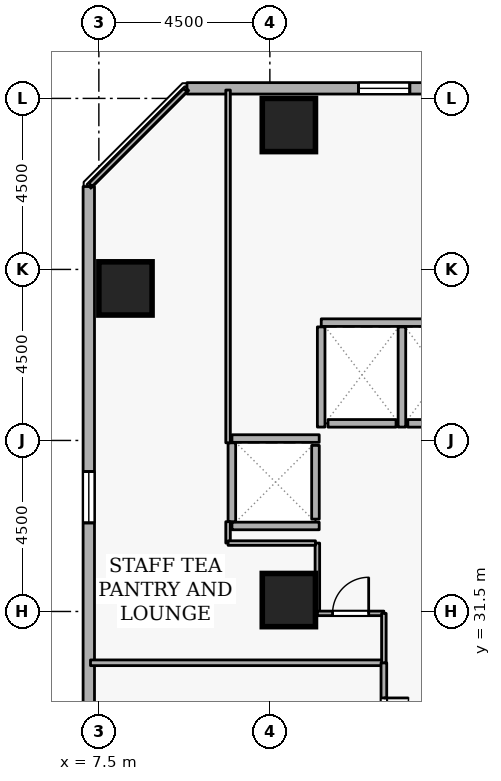
"""IFC4 building model, lengths in metres.
Left out: names, types, materials, properties, quantities, classifications, styles, units other than length and angle.
Written with IfcOpenShell. Run it as: python <this file> out.ifc"""

import sys

from ifc_helpers import new_model, si_unit, direction, frame, frame_2d, origin, origin_2d, place, context, subcontext, project, spatial, rectangle, extrude, element, fill, save


model = new_model("IFC4")
c1 = context("Model", 3, precision=1e-05, world=origin(), true_north=direction((0.0, 1.0)))
c2 = subcontext(c1, "Body", "Model", "MODEL_VIEW")
j1 = project(units=[si_unit("LENGTHUNIT", "METRE"), si_unit("PLANEANGLEUNIT", "RADIAN")], contexts=[c1])
p1 = place(None, origin())
s1 = spatial("IfcSite", under=j1, at=p1, CompositionType="ELEMENT")
p2 = place(p1, origin())
s2 = spatial("IfcBuilding", under=s1, at=p2, CompositionType="ELEMENT")
p3 = place(p2, frame((0.0, 0.0, 68.1)))
s3 = spatial("IfcBuildingStorey", under=s2, at=p3, CompositionType="ELEMENT", Elevation=68.1)
for number, where, z_axis, x_axis in (
    (1, (12.5, 44.3, 0.0), (0.0, 0.0, 1.0), (1.0, 0.0, 0.0)),
    (2, (8.2, 40.0, 0.0), (0.0, 0.0, 1.0), (1.0, 0.0, 0.0)),
    (3, (12.5, 31.8, 0.0), (0.0, 0.0, 1.0), (1.0, 0.0, 0.0)),
):
    element("IfcColumn", number, at=place(p3, frame(where, z_axis=z_axis, x_axis=x_axis)), inside=s3, PredefinedType="COLUMN", context=c2, shape_type="SweptSolid", body=[
        extrude(rectangle(XDim=1.4, YDim=1.4, at=origin_2d()), origin(), (0.0, 0.0, 1.0), 3.6),
    ])
p4 = place(p3, frame((47.181, 45.265, 0.0), z_axis=(0.0, 0.0, 1.0), x_axis=(-1.0, 0.0, 0.0)))
e4 = element("IfcWall", 4, at=p4, inside=s3, PredefinedType="STANDARD", context=c2, shape_type="SweptSolid", body=[
    extrude(rectangle(XDim=37.362, YDim=0.3, at=frame_2d((18.681, 0.0))), origin(), (0.0, 0.0, 1.0), 2.66),
])
p5 = place(p4, frame((2.7, 0.0, 0.72)))
e5 = element("IfcOpeningElement", 5, at=p5, cuts=e4, PredefinedType="OPENING", context=c2, shape_type="SweptSolid", body=[
    extrude(rectangle(XDim=1.35, YDim=1.05, at=frame_2d((0.675, 0.525))), frame((0.0, 0.16, 0.0), z_axis=(0.0, -1.0, 0.0), x_axis=(1.0, 0.0, 0.0)), (0.0, 0.0, 1.0), 0.32),
])
p6 = place(p4, frame((12.3, 0.0, 0.72)))
e6 = element("IfcOpeningElement", 6, at=p6, cuts=e4, PredefinedType="OPENING", context=c2, shape_type="SweptSolid", body=[
    extrude(rectangle(XDim=1.35, YDim=1.05, at=frame_2d((0.675, 0.525))), frame((0.0, 0.16, 0.0), z_axis=(0.0, -1.0, 0.0), x_axis=(1.0, 0.0, 0.0)), (0.0, 0.0, 1.0), 0.32),
])
p7 = place(p4, frame((17.1, 0.0, 0.72)))
e7 = element("IfcOpeningElement", 7, at=p7, cuts=e4, PredefinedType="OPENING", context=c2, shape_type="SweptSolid", body=[
    extrude(rectangle(XDim=1.35, YDim=1.05, at=frame_2d((0.675, 0.525))), frame((0.0, 0.16, 0.0), z_axis=(0.0, -1.0, 0.0), x_axis=(1.0, 0.0, 0.0)), (0.0, 0.0, 1.0), 0.32),
])
p8 = place(p4, frame((26.7, 0.0, 0.72)))
e8 = element("IfcOpeningElement", 8, at=p8, cuts=e4, PredefinedType="OPENING", context=c2, shape_type="SweptSolid", body=[
    extrude(rectangle(XDim=1.35, YDim=1.05, at=frame_2d((0.675, 0.525))), frame((0.0, 0.16, 0.0), z_axis=(0.0, -1.0, 0.0), x_axis=(1.0, 0.0, 0.0)), (0.0, 0.0, 1.0), 0.32),
])
p9 = place(p4, frame((31.5, 0.0, 0.72)))
e9 = element("IfcOpeningElement", 9, at=p9, cuts=e4, PredefinedType="OPENING", context=c2, shape_type="SweptSolid", body=[
    extrude(rectangle(XDim=1.35, YDim=1.05, at=frame_2d((0.675, 0.525))), frame((0.0, 0.16, 0.0), z_axis=(0.0, -1.0, 0.0), x_axis=(1.0, 0.0, 0.0)), (0.0, 0.0, 1.0), 0.32),
])
p10 = place(p3, frame((7.235, 42.681, 0.0), z_axis=(0.0, 0.0, 1.0), x_axis=(0.0, -1.0, 0.0)))
e10 = element("IfcWall", 10, at=p10, inside=s3, PredefinedType="STANDARD", context=c2, shape_type="SweptSolid", body=[
    extrude(rectangle(XDim=37.362, YDim=0.3, at=frame_2d((18.681, 0.0))), origin(), (0.0, 0.0, 1.0), 2.66),
])
p11 = place(p10, frame((7.5, 0.0, 0.72)))
e11 = element("IfcOpeningElement", 11, at=p11, cuts=e10, PredefinedType="OPENING", context=c2, shape_type="SweptSolid", body=[
    extrude(rectangle(XDim=1.35, YDim=1.05, at=frame_2d((0.675, 0.525))), frame((0.0, 0.16, 0.0), z_axis=(0.0, -1.0, 0.0), x_axis=(1.0, 0.0, 0.0)), (0.0, 0.0, 1.0), 0.32),
])
p12 = place(p10, frame((17.1, 0.0, 0.72)))
e12 = element("IfcOpeningElement", 12, at=p12, cuts=e10, PredefinedType="OPENING", context=c2, shape_type="SweptSolid", body=[
    extrude(rectangle(XDim=1.35, YDim=1.05, at=frame_2d((0.675, 0.525))), frame((0.0, 0.16, 0.0), z_axis=(0.0, -1.0, 0.0), x_axis=(1.0, 0.0, 0.0)), (0.0, 0.0, 1.0), 0.32),
])
p13 = place(p10, frame((21.9, 0.0, 0.72)))
e13 = element("IfcOpeningElement", 13, at=p13, cuts=e10, PredefinedType="OPENING", context=c2, shape_type="SweptSolid", body=[
    extrude(rectangle(XDim=1.35, YDim=1.05, at=frame_2d((0.675, 0.525))), frame((0.0, 0.16, 0.0), z_axis=(0.0, -1.0, 0.0), x_axis=(1.0, 0.0, 0.0)), (0.0, 0.0, 1.0), 0.32),
])
p14 = place(p3, frame((17.37, 36.45, 0.0), z_axis=(0.0, 0.0, 1.0), x_axis=(-1.0, 0.0, 0.0)))
e14 = element("IfcWall", 14, at=p14, inside=s3, PredefinedType="STANDARD", context=c2, shape_type="SweptSolid", body=[
    extrude(rectangle(XDim=1.74, YDim=0.2, at=frame_2d((0.87, 0.0))), origin(), (0.0, 0.0, 1.0), 3.26),
])
p15 = place(p3, frame((15.32, 36.45, 0.0), z_axis=(0.0, 0.0, 1.0), x_axis=(-1.0, 0.0, 0.0)))
e15 = element("IfcWall", 15, at=p15, inside=s3, PredefinedType="STANDARD", context=c2, shape_type="SweptSolid", body=[
    extrude(rectangle(XDim=1.79, YDim=0.2, at=frame_2d((0.895, 0.0))), origin(), (0.0, 0.0, 1.0), 3.26),
])
p16 = place(p3, frame((13.2, 33.93, 0.0), z_axis=(0.0, 0.0, 1.0), x_axis=(0.0, 1.0, 0.0)))
e16 = element("IfcWall", 16, at=p16, inside=s3, PredefinedType="STANDARD", context=c2, shape_type="SweptSolid", body=[
    extrude(rectangle(XDim=1.94, YDim=0.2, at=frame_2d((0.97, 0.0))), origin(), (0.0, 0.0, 1.0), 3.26),
])
p17 = place(p3, frame((13.352, 39.1, 0.0), z_axis=(0.0, 0.0, 1.0), x_axis=(1.0, 0.0, 0.0)))
e17 = element("IfcWall", 17, at=p17, inside=s3, PredefinedType="STANDARD", context=c2, shape_type="SweptSolid", body=[
    extrude(rectangle(XDim=4.196, YDim=0.2, at=frame_2d((2.098, 0.0))), origin(), (0.0, 0.0, 1.0), 3.26),
])
for number, where, z_axis, x_axis in (
    (18, (15.475, 36.352, 0.0), (0.0, 0.0, 1.0), (0.0, 1.0, 0.0)),
    (19, (13.35, 36.352, 0.0), (0.0, 0.0, 1.0), (0.0, 1.0, 0.0)),
):
    element("IfcWall", number, at=place(p3, frame(where, z_axis=z_axis, x_axis=x_axis)), inside=s3, PredefinedType="STANDARD", context=c2, shape_type="SweptSolid", body=[
        extrude(rectangle(XDim=2.636, YDim=0.2, at=frame_2d((1.318, 0.0))), origin(), (0.0, 0.0, 1.0), 3.26),
    ])
for number, where, z_axis, x_axis in (
    (20, (11.002, 36.05, 0.0), (0.0, 0.0, 1.0), (1.0, 0.0, 0.0)),
    (21, (11.002, 33.75, 0.0), (0.0, 0.0, 1.0), (1.0, 0.0, 0.0)),
):
    element("IfcWall", number, at=place(p3, frame(where, z_axis=z_axis, x_axis=x_axis)), inside=s3, PredefinedType="STANDARD", context=c2, shape_type="SweptSolid", body=[
        extrude(rectangle(XDim=2.296, YDim=0.2, at=frame_2d((1.148, 0.0))), origin(), (0.0, 0.0, 1.0), 3.26),
    ])
p18 = place(p3, frame((11.0, 33.862, 0.0), z_axis=(0.0, 0.0, 1.0), x_axis=(0.0, 1.0, 0.0)))
e22 = element("IfcWall", 22, at=p18, inside=s3, PredefinedType="STANDARD", context=c2, shape_type="SweptSolid", body=[
    extrude(rectangle(XDim=2.076, YDim=0.2, at=frame_2d((1.038, 0.0))), origin(), (0.0, 0.0, 1.0), 3.26),
])
p19 = place(p3, frame((7.28, 30.15, 0.0), z_axis=(0.0, 0.0, 1.0), x_axis=(1.0, 0.0, 0.0)))
e23 = element("IfcWall", 23, at=p19, inside=s3, PredefinedType="PARTITIONING", context=c2, shape_type="SweptSolid", body=[
    extrude(rectangle(XDim=7.72, YDim=0.15, at=frame_2d((3.86, 0.0))), origin(), (0.0, 0.0, 1.0), 3.26),
])
p20 = place(p3, frame((15.0, 30.15, 0.0), z_axis=(0.0, 0.0, 1.0), x_axis=(0.0, -1.0, 0.0)))
e24 = element("IfcWall", 24, at=p20, inside=s3, PredefinedType="PARTITIONING", context=c2, shape_type="SweptSolid", body=[
    extrude(rectangle(XDim=3.15, YDim=0.15, at=frame_2d((1.575, 0.0))), origin(), (0.0, 0.0, 1.0), 3.26),
])
p21 = place(p20, frame((0.925, 0.0, 0.0)))
e25 = element("IfcOpeningElement", 25, at=p21, cuts=e24, PredefinedType="OPENING", context=c2, shape_type="SweptSolid", body=[
    extrude(rectangle(XDim=1.3, YDim=2.12, at=frame_2d((0.65, 1.06))), frame((0.0, 0.085, 0.0), z_axis=(0.0, -1.0, 0.0), x_axis=(1.0, 0.0, 0.0)), (0.0, 0.0, 1.0), 0.17),
])
p22 = place(p3, frame((13.25, 33.3, 0.0), z_axis=(0.0, 0.0, 1.0), x_axis=(0.0, -1.0, 0.0)))
e26 = element("IfcWall", 26, at=p22, inside=s3, PredefinedType="PARTITIONING", context=c2, shape_type="SweptSolid", body=[
    extrude(rectangle(XDim=1.85, YDim=0.12, at=frame_2d((0.925, 0.0))), origin(), (0.0, 0.0, 1.0), 3.26),
])
p23 = place(p3, frame((13.25, 31.45, 0.0), z_axis=(0.0, 0.0, 1.0), x_axis=(1.0, 0.0, 0.0)))
e27 = element("IfcWall", 27, at=p23, inside=s3, PredefinedType="PARTITIONING", context=c2, shape_type="SweptSolid", body=[
    extrude(rectangle(XDim=1.75, YDim=0.12, at=frame_2d((0.875, 0.0))), origin(), (0.0, 0.0, 1.0), 3.26),
])
p24 = place(p23, frame((0.4, 0.0, 0.0)))
e28 = element("IfcOpeningElement", 28, at=p24, cuts=e27, PredefinedType="OPENING", context=c2, shape_type="SweptSolid", body=[
    extrude(rectangle(XDim=0.95, YDim=2.1, at=frame_2d((0.475, 1.05))), frame((0.0, 0.07, 0.0), z_axis=(0.0, -1.0, 0.0), x_axis=(1.0, 0.0, 0.0)), (0.0, 0.0, 1.0), 0.14),
])
p25 = place(p3, frame((15.0, 31.45, 0.0), z_axis=(0.0, 0.0, 1.0), x_axis=(0.0, -1.0, 0.0)))
e29 = element("IfcWall", 29, at=p25, inside=s3, PredefinedType="PARTITIONING", context=c2, shape_type="SweptSolid", body=[
    extrude(rectangle(XDim=1.3, YDim=0.12, at=frame_2d((0.65, 0.0))), origin(), (0.0, 0.0, 1.0), 3.26),
])
p26 = place(p3, frame((7.28, 42.725, 0.0), z_axis=(0.0, 0.0, 1.0), x_axis=(0.707106781187, 0.707106781187, 0.0)))
e30 = element("IfcWall", 30, at=p26, inside=s3, PredefinedType="PARTITIONING", context=c2, shape_type="SweptSolid", body=[
    extrude(rectangle(XDim=3.528, YDim=0.12, at=frame_2d((1.764, 0.0))), origin(), (0.0, 0.0, 1.0), 3.26),
])
p27 = place(p3, frame((10.9, 45.22, 0.0), z_axis=(0.0, 0.0, 1.0), x_axis=(0.0, -1.0, 0.0)))
e31 = element("IfcWall", 31, at=p27, inside=s3, PredefinedType="PARTITIONING", context=c2, shape_type="SweptSolid", body=[
    extrude(rectangle(XDim=9.282, YDim=0.12, at=frame_2d((4.641, 0.0))), origin(), (0.0, 0.0, 1.0), 3.26),
])
p28 = place(p3, frame((10.9, 33.862, 0.0), z_axis=(0.0, 0.0, 1.0), x_axis=(0.0, -1.0, 0.0)))
e32 = element("IfcWall", 32, at=p28, inside=s3, PredefinedType="PARTITIONING", context=c2, shape_type="SweptSolid", body=[
    extrude(rectangle(XDim=0.562, YDim=0.12, at=frame_2d((0.281, 0.0))), origin(), (0.0, 0.0, 1.0), 3.26),
])
p29 = place(p3, frame((10.9, 33.3, 0.0), z_axis=(0.0, 0.0, 1.0), x_axis=(1.0, 0.0, 0.0)))
e33 = element("IfcWall", 33, at=p29, inside=s3, PredefinedType="PARTITIONING", context=c2, shape_type="SweptSolid", body=[
    extrude(rectangle(XDim=2.3, YDim=0.12, at=frame_2d((1.15, 0.0))), origin(), (0.0, 0.0, 1.0), 3.26),
])
p30 = place(p9, origin())
e34 = element("IfcWindow", 34, at=p30, inside=s3, PartitioningType="SINGLE_PANEL", PredefinedType="WINDOW", context=c2, shape_type="SweptSolid", body=[
    extrude(rectangle(XDim=1.35, YDim=1.05, at=frame_2d((0.675, 0.525))), frame((0.0, 0.03, 0.0), z_axis=(0.0, -1.0, 0.0), x_axis=(1.0, 0.0, 0.0)), (0.0, 0.0, 1.0), 0.06),
])
fill(e9, e34)
p31 = place(p11, origin())
e35 = element("IfcWindow", 35, at=p31, inside=s3, PartitioningType="SINGLE_PANEL", PredefinedType="WINDOW", context=c2, shape_type="SweptSolid", body=[
    extrude(rectangle(XDim=1.35, YDim=1.05, at=frame_2d((0.675, 0.525))), frame((0.0, 0.03, 0.0), z_axis=(0.0, -1.0, 0.0), x_axis=(1.0, 0.0, 0.0)), (0.0, 0.0, 1.0), 0.06),
])
fill(e11, e35)
p32 = place(p21, origin())
e36 = element("IfcDoor", 36, at=p32, inside=s3, OperationType="DOUBLE_DOOR_SINGLE_SWING", PredefinedType="DOOR", context=c2, shape_type="SweptSolid", body=[
    extrude(rectangle(XDim=1.3, YDim=2.12, at=frame_2d((0.65, 1.06))), frame((0.0, 0.025, 0.0), z_axis=(0.0, -1.0, 0.0), x_axis=(1.0, 0.0, 0.0)), (0.0, 0.0, 1.0), 0.05),
])
fill(e25, e36)
p33 = place(p24, origin())
e37 = element("IfcDoor", 37, at=p33, inside=s3, OperationType="SINGLE_SWING_RIGHT", PredefinedType="DOOR", context=c2, shape_type="SweptSolid", body=[
    extrude(rectangle(XDim=0.95, YDim=2.1, at=frame_2d((0.475, 1.05))), frame((0.0, 0.025, 0.0), z_axis=(0.0, -1.0, 0.0), x_axis=(1.0, 0.0, 0.0)), (0.0, 0.0, 1.0), 0.05),
])
fill(e28, e37)
save(model, sys.argv[1])
